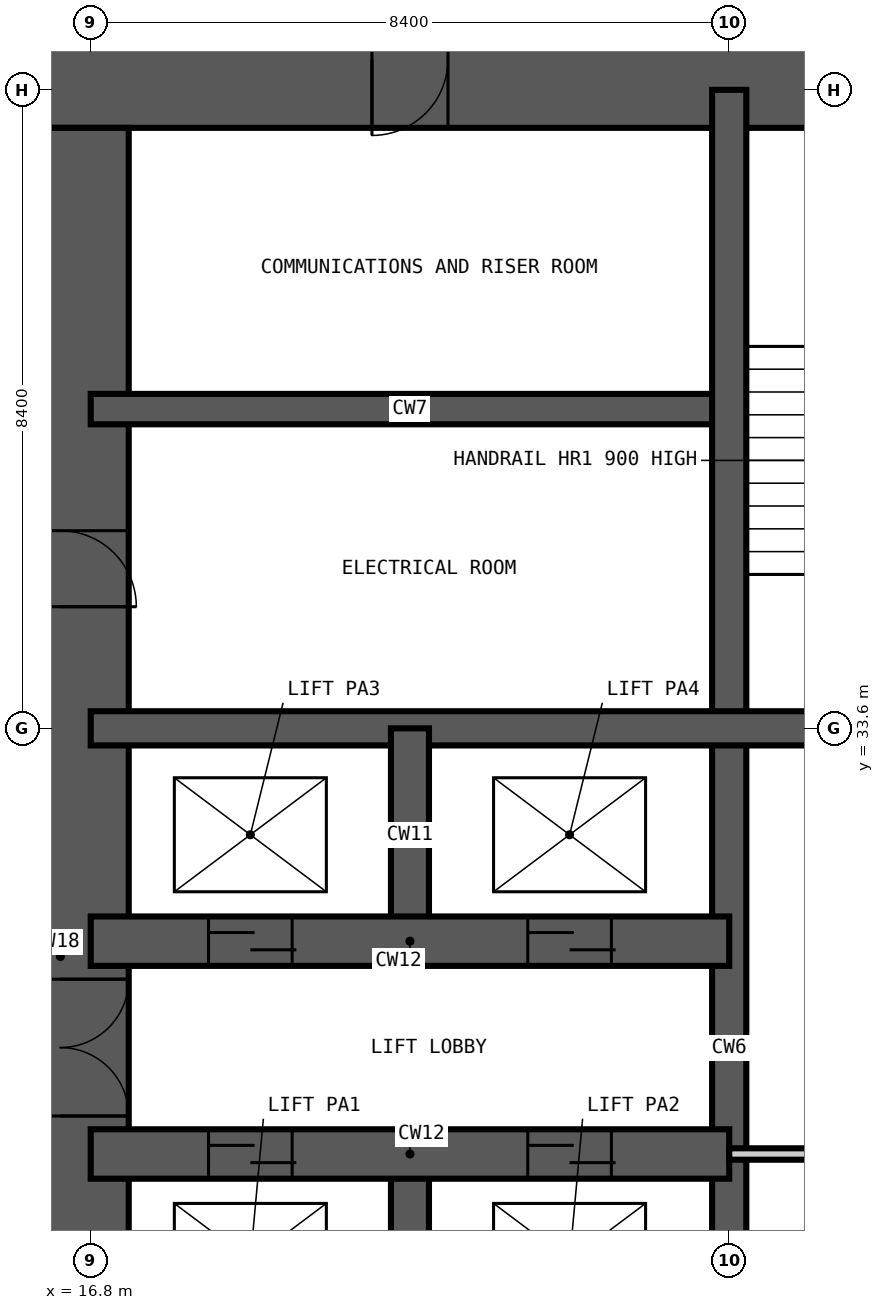
"""IFC4 building model, lengths in metres.
Left out: names, types, materials, properties, quantities, classifications, styles, units other than length and angle.
Written with IfcOpenShell. Run it as: python <this file> out.ifc"""

import sys

from ifc_helpers import new_model, si_unit, direction, frame, frame_2d, origin, place, context, subcontext, project, spatial, rectangle, extrude, element, fill, save


model = new_model("IFC4")
c1 = context("Model", 3, precision=1e-05, world=origin(), true_north=direction((0.0, 1.0)))
c2 = subcontext(c1, "Body", "Model", "MODEL_VIEW")
j1 = project(units=[si_unit("LENGTHUNIT", "METRE"), si_unit("PLANEANGLEUNIT", "RADIAN")], contexts=[c1])
p1 = place(None, origin())
s1 = spatial("IfcSite", under=j1, at=p1, CompositionType="ELEMENT")
p2 = place(p1, origin())
s2 = spatial("IfcBuilding", under=s1, at=p2, CompositionType="ELEMENT")
p3 = place(p2, frame((0.0, 0.0, 30.6)))
s3 = spatial("IfcBuildingStorey", under=s2, at=p3, CompositionType="ELEMENT", Elevation=30.6)
p4 = place(p3, frame((43.3, 42.4, -0.35), z_axis=(0.0, 0.0, 1.0), x_axis=(-1.0, 0.0, 0.0)))
e1 = element("IfcWall", 1, at=p4, inside=s3, PredefinedType="SHEAR", context=c2, shape_type="SweptSolid", body=[
    extrude(rectangle(XDim=27.8, YDim=1.8, at=frame_2d((13.9, 0.0))), origin(), (0.0, 0.0, 1.0), 3.6),
])
p5 = place(p4, frame((21.8, 0.0, 0.35)))
e2 = element("IfcOpeningElement", 2, at=p5, cuts=e1, PredefinedType="OPENING", context=c2, shape_type="SweptSolid", body=[
    extrude(rectangle(XDim=1.0, YDim=2.1, at=frame_2d((0.5, 1.05))), frame((0.0, 0.91, 0.0), z_axis=(0.0, -1.0, 0.0), x_axis=(1.0, 0.0, 0.0)), (0.0, 0.0, 1.0), 1.82),
])
p6 = place(p4, frame((11.2, 0.0, 0.35)))
e3 = element("IfcOpeningElement", 3, at=p6, cuts=e1, PredefinedType="OPENING", context=c2, shape_type="SweptSolid", body=[
    extrude(rectangle(XDim=1.2, YDim=2.2, at=frame_2d((0.6, 1.1))), frame((0.0, 0.91, 0.0), z_axis=(0.0, -1.0, 0.0), x_axis=(1.0, 0.0, 0.0)), (0.0, 0.0, 1.0), 1.82),
])
p7 = place(p3, frame((16.4, 41.5, -0.35), z_axis=(0.0, 0.0, 1.0), x_axis=(0.0, -1.0, 0.0)))
e4 = element("IfcWall", 4, at=p7, inside=s3, PredefinedType="SHEAR", context=c2, shape_type="SweptSolid", body=[
    extrude(rectangle(XDim=24.2, YDim=1.8, at=frame_2d((12.1, 0.0))), origin(), (0.0, 0.0, 1.0), 3.6),
])
p8 = place(p7, frame((11.2, 0.0, 0.35)))
e5 = element("IfcOpeningElement", 5, at=p8, cuts=e4, PredefinedType="OPENING", context=c2, shape_type="SweptSolid", body=[
    extrude(rectangle(XDim=1.8, YDim=2.2, at=frame_2d((0.9, 1.1))), frame((0.0, 0.91, 0.0), z_axis=(0.0, -1.0, 0.0), x_axis=(1.0, 0.0, 0.0)), (0.0, 0.0, 1.0), 1.82),
])
p9 = place(p7, frame((20.0, 0.0, 0.35)))
e6 = element("IfcOpeningElement", 6, at=p9, cuts=e4, PredefinedType="OPENING", context=c2, shape_type="SweptSolid", body=[
    extrude(rectangle(XDim=1.0, YDim=2.1, at=frame_2d((0.5, 1.05))), frame((0.0, 0.91, 0.0), z_axis=(0.0, -1.0, 0.0), x_axis=(1.0, 0.0, 0.0)), (0.0, 0.0, 1.0), 1.82),
])
p10 = place(p7, frame((5.3, 0.0, 0.35)))
e7 = element("IfcOpeningElement", 7, at=p10, cuts=e4, PredefinedType="OPENING", context=c2, shape_type="SweptSolid", body=[
    extrude(rectangle(XDim=1.0, YDim=2.1, at=frame_2d((0.5, 1.05))), frame((0.0, 0.91, 0.0), z_axis=(0.0, -1.0, 0.0), x_axis=(1.0, 0.0, 0.0)), (0.0, 0.0, 1.0), 1.82),
])
p11 = place(p3, frame((16.8, 37.8, -0.35), z_axis=(0.0, 0.0, 1.0), x_axis=(1.0, 0.0, 0.0)))
e8 = element("IfcWall", 8, at=p11, inside=s3, PredefinedType="SHEAR", context=c2, shape_type="SweptSolid", body=[
    extrude(rectangle(XDim=8.4, YDim=0.4, at=frame_2d((4.2, 0.0))), origin(), (0.0, 0.0, 1.0), 3.6),
])
for number, where, z_axis, x_axis in (
    (9, (25.2, 16.8, -0.35), (0.0, 0.0, 1.0), (0.0, 1.0, 0.0)),
    (10, (16.8, 33.6, -0.35), (0.0, 0.0, 1.0), (1.0, 0.0, 0.0)),
):
    element("IfcWall", number, at=place(p3, frame(where, z_axis=z_axis, x_axis=x_axis)), inside=s3, PredefinedType="SHEAR", context=c2, shape_type="SweptSolid", body=[
        extrude(rectangle(XDim=25.2, YDim=0.45, at=frame_2d((12.6, 0.0))), origin(), (0.0, 0.0, 1.0), 3.6),
    ])
for number, where, z_axis, x_axis in (
    (11, (21.0, 25.2, -0.35), (0.0, 0.0, 1.0), (0.0, 1.0, 0.0)),
    (12, (21.0, 30.8, -0.35), (0.0, 0.0, 1.0), (0.0, 1.0, 0.0)),
):
    element("IfcWall", number, at=place(p3, frame(where, z_axis=z_axis, x_axis=x_axis)), inside=s3, PredefinedType="SHEAR", context=c2, shape_type="SweptSolid", body=[
        extrude(rectangle(XDim=2.8, YDim=0.5, at=frame_2d((1.4, 0.0))), origin(), (0.0, 0.0, 1.0), 3.6),
    ])
p12 = place(p3, frame((16.8, 28.0, -0.35), z_axis=(0.0, 0.0, 1.0), x_axis=(1.0, 0.0, 0.0)))
e13 = element("IfcWall", 13, at=p12, inside=s3, PredefinedType="SHEAR", context=c2, shape_type="SweptSolid", body=[
    extrude(rectangle(XDim=8.4, YDim=0.65, at=frame_2d((4.2, 0.0))), origin(), (0.0, 0.0, 1.0), 3.6),
])
p13 = place(p12, frame((1.55, 0.0, 0.35)))
e14 = element("IfcOpeningElement", 14, at=p13, cuts=e13, PredefinedType="OPENING", context=c2, shape_type="SweptSolid", body=[
    extrude(rectangle(XDim=1.1, YDim=2.2, at=frame_2d((0.55, 1.1))), frame((0.0, 0.335, 0.0), z_axis=(0.0, -1.0, 0.0), x_axis=(1.0, 0.0, 0.0)), (0.0, 0.0, 1.0), 0.67),
])
p14 = place(p12, frame((5.75, 0.0, 0.35)))
e15 = element("IfcOpeningElement", 15, at=p14, cuts=e13, PredefinedType="OPENING", context=c2, shape_type="SweptSolid", body=[
    extrude(rectangle(XDim=1.1, YDim=2.2, at=frame_2d((0.55, 1.1))), frame((0.0, 0.335, 0.0), z_axis=(0.0, -1.0, 0.0), x_axis=(1.0, 0.0, 0.0)), (0.0, 0.0, 1.0), 0.67),
])
p15 = place(p3, frame((16.8, 30.8, -0.35), z_axis=(0.0, 0.0, 1.0), x_axis=(1.0, 0.0, 0.0)))
e16 = element("IfcWall", 16, at=p15, inside=s3, PredefinedType="SHEAR", context=c2, shape_type="SweptSolid", body=[
    extrude(rectangle(XDim=8.4, YDim=0.65, at=frame_2d((4.2, 0.0))), origin(), (0.0, 0.0, 1.0), 3.6),
])
p16 = place(p15, frame((1.55, 0.0, 0.35)))
e17 = element("IfcOpeningElement", 17, at=p16, cuts=e16, PredefinedType="OPENING", context=c2, shape_type="SweptSolid", body=[
    extrude(rectangle(XDim=1.1, YDim=2.2, at=frame_2d((0.55, 1.1))), frame((0.0, 0.335, 0.0), z_axis=(0.0, -1.0, 0.0), x_axis=(1.0, 0.0, 0.0)), (0.0, 0.0, 1.0), 0.67),
])
p17 = place(p15, frame((5.75, 0.0, 0.35)))
e18 = element("IfcOpeningElement", 18, at=p17, cuts=e16, PredefinedType="OPENING", context=c2, shape_type="SweptSolid", body=[
    extrude(rectangle(XDim=1.1, YDim=2.2, at=frame_2d((0.55, 1.1))), frame((0.0, 0.335, 0.0), z_axis=(0.0, -1.0, 0.0), x_axis=(1.0, 0.0, 0.0)), (0.0, 0.0, 1.0), 0.67),
])
p18 = place(p3, frame((25.2, 28.0, 0.0), z_axis=(0.0, 0.0, 1.0), x_axis=(1.0, 0.0, 0.0)))
e19 = element("IfcWall", 19, at=p18, inside=s3, PredefinedType="PARTITIONING", context=c2, shape_type="SweptSolid", body=[
    extrude(rectangle(XDim=8.4, YDim=0.15, at=frame_2d((4.2, 0.0))), origin(), (0.0, 0.0, 1.0), 3.25),
])
p19 = place(p18, frame((3.7, 0.0, 0.0)))
e20 = element("IfcOpeningElement", 20, at=p19, cuts=e19, PredefinedType="OPENING", context=c2, shape_type="SweptSolid", body=[
    extrude(rectangle(XDim=1.0, YDim=2.1, at=frame_2d((0.5, 1.05))), frame((0.0, 0.085, 0.0), z_axis=(0.0, -1.0, 0.0), x_axis=(1.0, 0.0, 0.0)), (0.0, 0.0, 1.0), 0.17),
])
p20 = place(p13, origin())
e21 = element("IfcDoor", 21, at=p20, inside=s3, OperationType="DOUBLE_DOOR_SLIDING", PredefinedType="DOOR", context=c2, shape_type="SweptSolid", body=[
    extrude(rectangle(XDim=1.1, YDim=2.2, at=frame_2d((0.55, 1.1))), frame((0.0, 0.025, 0.0), z_axis=(0.0, -1.0, 0.0), x_axis=(1.0, 0.0, 0.0)), (0.0, 0.0, 1.0), 0.05),
])
fill(e14, e21)
p21 = place(p14, origin())
e22 = element("IfcDoor", 22, at=p21, inside=s3, OperationType="DOUBLE_DOOR_SLIDING", PredefinedType="DOOR", context=c2, shape_type="SweptSolid", body=[
    extrude(rectangle(XDim=1.1, YDim=2.2, at=frame_2d((0.55, 1.1))), frame((0.0, 0.025, 0.0), z_axis=(0.0, -1.0, 0.0), x_axis=(1.0, 0.0, 0.0)), (0.0, 0.0, 1.0), 0.05),
])
fill(e15, e22)
p22 = place(p16, origin())
e23 = element("IfcDoor", 23, at=p22, inside=s3, OperationType="DOUBLE_DOOR_SLIDING", PredefinedType="DOOR", context=c2, shape_type="SweptSolid", body=[
    extrude(rectangle(XDim=1.1, YDim=2.2, at=frame_2d((0.55, 1.1))), frame((0.0, 0.025, 0.0), z_axis=(0.0, -1.0, 0.0), x_axis=(1.0, 0.0, 0.0)), (0.0, 0.0, 1.0), 0.05),
])
fill(e17, e23)
p23 = place(p17, origin())
e24 = element("IfcDoor", 24, at=p23, inside=s3, OperationType="DOUBLE_DOOR_SLIDING", PredefinedType="DOOR", context=c2, shape_type="SweptSolid", body=[
    extrude(rectangle(XDim=1.1, YDim=2.2, at=frame_2d((0.55, 1.1))), frame((0.0, 0.025, 0.0), z_axis=(0.0, -1.0, 0.0), x_axis=(1.0, 0.0, 0.0)), (0.0, 0.0, 1.0), 0.05),
])
fill(e18, e24)
p24 = place(p8, origin())
e25 = element("IfcDoor", 25, at=p24, inside=s3, OperationType="DOUBLE_DOOR_DOUBLE_SWING", PredefinedType="DOOR", context=c2, shape_type="SweptSolid", body=[
    extrude(rectangle(XDim=1.8, YDim=2.2, at=frame_2d((0.9, 1.1))), frame((0.0, 0.025, 0.0), z_axis=(0.0, -1.0, 0.0), x_axis=(1.0, 0.0, 0.0)), (0.0, 0.0, 1.0), 0.05),
])
fill(e5, e25)
p25 = place(p10, origin())
e26 = element("IfcDoor", 26, at=p25, inside=s3, OperationType="SINGLE_SWING_RIGHT", PredefinedType="DOOR", context=c2, shape_type="SweptSolid", body=[
    extrude(rectangle(XDim=1.0, YDim=2.1, at=frame_2d((0.5, 1.05))), frame((0.0, 0.025, 0.0), z_axis=(0.0, -1.0, 0.0), x_axis=(1.0, 0.0, 0.0)), (0.0, 0.0, 1.0), 0.05),
])
fill(e7, e26)
p26 = place(p5, origin())
e27 = element("IfcDoor", 27, at=p26, inside=s3, OperationType="SINGLE_SWING_RIGHT", PredefinedType="DOOR", context=c2, shape_type="SweptSolid", body=[
    extrude(rectangle(XDim=1.0, YDim=2.1, at=frame_2d((0.5, 1.05))), frame((0.0, 0.025, 0.0), z_axis=(0.0, -1.0, 0.0), x_axis=(1.0, 0.0, 0.0)), (0.0, 0.0, 1.0), 0.05),
])
fill(e2, e27)
save(model, sys.argv[1])
